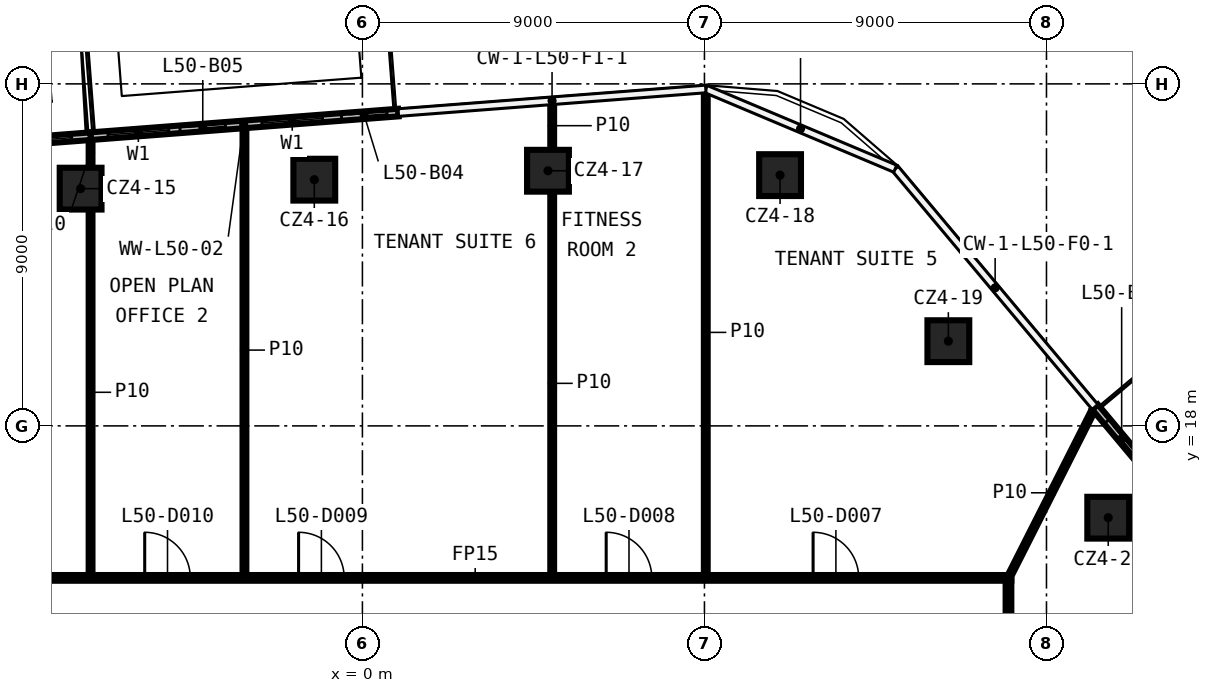
"""IFC4 building model, lengths in metres.
Left out: names, types, materials, properties, quantities, classifications, styles, units other than length and angle.
Written with IfcOpenShell. Run it as: python <this file> out.ifc"""

import sys

from ifc_helpers import new_model, si_unit, direction, frame, frame_2d, origin, origin_2d, place, context, subcontext, project, spatial, rectangle, extrude, element, fill, save


model = new_model("IFC4")
c1 = context("Model", 3, precision=1e-05, world=origin(), true_north=direction((0.0, 1.0)))
c2 = subcontext(c1, "Body", "Model", "MODEL_VIEW")
j1 = project(units=[si_unit("LENGTHUNIT", "METRE"), si_unit("PLANEANGLEUNIT", "RADIAN")], contexts=[c1])
p1 = place(None, origin())
s1 = spatial("IfcSite", under=j1, at=p1, CompositionType="ELEMENT")
p2 = place(p1, origin())
s2 = spatial("IfcBuilding", under=s1, at=p2, CompositionType="ELEMENT")
p3 = place(p2, frame((0.0, 0.0, 241.2)))
s3 = spatial("IfcBuildingStorey", under=s2, at=p3, CompositionType="ELEMENT", Elevation=241.2)
for number, where, z_axis, x_axis in (
    (1, (-7.415, 24.243, 0.0), (0.0, 0.0, 1.0), (1.0, 0.0, 0.0)),
    (2, (-1.266, 24.479, 0.0), (0.0, 0.0, 1.0), (1.0, 0.0, 0.0)),
    (3, (4.883, 24.714, 0.0), (0.0, 0.0, 1.0), (1.0, 0.0, 0.0)),
    (4, (10.99, 24.599, 0.0), (0.0, 0.0, 1.0), (1.0, 0.0, 0.0)),
    (5, (15.418, 20.229, 0.0), (0.0, 0.0, 1.0), (1.0, 0.0, 0.0)),
    (6, (19.625, 15.584, 0.0), (0.0, 0.0, 1.0), (1.0, 0.0, 0.0)),
):
    element("IfcColumn", number, at=place(p3, frame(where, z_axis=z_axis, x_axis=x_axis)), inside=s3, PredefinedType="COLUMN", context=c2, shape_type="SweptSolid", body=[
        extrude(rectangle(XDim=1.1, YDim=1.1, at=origin_2d()), origin(), (0.0, 0.0, 1.0), 3.82),
    ])
p4 = place(p3, frame((-9.075, 14.0, 0.0), z_axis=(0.0, 0.0, 1.0), x_axis=(1.0, 0.0, 0.0)))
e7 = element("IfcWall", 7, at=p4, inside=s3, PredefinedType="PARTITIONING", context=c2, shape_type="SweptSolid", body=[
    extrude(rectangle(XDim=26.15, YDim=0.15, at=frame_2d((13.075, 0.0))), origin(), (0.0, 0.0, 1.0), 3.82),
])
p5 = place(p4, frame((20.934, 0.0, 0.0)))
e8 = element("IfcOpeningElement", 8, at=p5, cuts=e7, PredefinedType="OPENING", context=c2, shape_type="SweptSolid", body=[
    extrude(rectangle(XDim=1.2, YDim=2.1, at=frame_2d((0.6, 1.05))), frame((0.0, 0.085, 0.0), z_axis=(0.0, -1.0, 0.0), x_axis=(1.0, 0.0, 0.0)), (0.0, 0.0, 1.0), 0.17),
])
p6 = place(p4, frame((15.49, 0.0, 0.0)))
e9 = element("IfcOpeningElement", 9, at=p6, cuts=e7, PredefinedType="OPENING", context=c2, shape_type="SweptSolid", body=[
    extrude(rectangle(XDim=1.2, YDim=2.1, at=frame_2d((0.6, 1.05))), frame((0.0, 0.085, 0.0), z_axis=(0.0, -1.0, 0.0), x_axis=(1.0, 0.0, 0.0)), (0.0, 0.0, 1.0), 0.17),
])
p7 = place(p4, frame((7.396, 0.0, 0.0)))
e10 = element("IfcOpeningElement", 10, at=p7, cuts=e7, PredefinedType="OPENING", context=c2, shape_type="SweptSolid", body=[
    extrude(rectangle(XDim=1.2, YDim=2.1, at=frame_2d((0.6, 1.05))), frame((0.0, 0.085, 0.0), z_axis=(0.0, -1.0, 0.0), x_axis=(1.0, 0.0, 0.0)), (0.0, 0.0, 1.0), 0.17),
])
p8 = place(p4, frame((3.346, 0.0, 0.0)))
e11 = element("IfcOpeningElement", 11, at=p8, cuts=e7, PredefinedType="OPENING", context=c2, shape_type="SweptSolid", body=[
    extrude(rectangle(XDim=1.2, YDim=2.1, at=frame_2d((0.6, 1.05))), frame((0.0, 0.085, 0.0), z_axis=(0.0, -1.0, 0.0), x_axis=(1.0, 0.0, 0.0)), (0.0, 0.0, 1.0), 0.17),
])
p9 = place(p3, frame((17.0, 14.0, 0.0), z_axis=(0.0, 0.0, 1.0), x_axis=(0.451643796449, 0.892198341811, 0.0)))
e12 = element("IfcWall", 12, at=p9, inside=s3, PredefinedType="PARTITIONING", context=c2, shape_type="SweptSolid", body=[
    extrude(rectangle(XDim=5.02, YDim=0.1, at=frame_2d((2.51, 0.0))), origin(), (0.0, 0.0, 1.0), 3.82),
])
p10 = place(p3, frame((17.0, 13.925, 0.0), z_axis=(0.0, 0.0, 1.0), x_axis=(0.0, -1.0, 0.0)))
e13 = element("IfcWall", 13, at=p10, inside=s3, PredefinedType="PARTITIONING", context=c2, shape_type="SweptSolid", body=[
    extrude(rectangle(XDim=27.85, YDim=0.15, at=frame_2d((13.925, 0.0))), origin(), (0.0, 0.0, 1.0), 3.82),
])
p11 = place(p10, frame((16.802, 0.0, 0.0)))
e14 = element("IfcOpeningElement", 14, at=p11, cuts=e13, PredefinedType="OPENING", context=c2, shape_type="SweptSolid", body=[
    extrude(rectangle(XDim=1.2, YDim=2.1, at=frame_2d((0.6, 1.05))), frame((0.0, 0.085, 0.0), z_axis=(0.0, -1.0, 0.0), x_axis=(1.0, 0.0, 0.0)), (0.0, 0.0, 1.0), 0.17),
])
p12 = place(p10, frame((12.534, 0.0, 0.0)))
e15 = element("IfcOpeningElement", 15, at=p12, cuts=e13, PredefinedType="OPENING", context=c2, shape_type="SweptSolid", body=[
    extrude(rectangle(XDim=1.2, YDim=2.1, at=frame_2d((0.6, 1.05))), frame((0.0, 0.085, 0.0), z_axis=(0.0, -1.0, 0.0), x_axis=(1.0, 0.0, 0.0)), (0.0, 0.0, 1.0), 0.17),
])
p13 = place(p3, frame((9.035, 14.075, 0.0), z_axis=(0.0, 0.0, 1.0), x_axis=(0.0, 1.0, 0.0)))
e16 = element("IfcWall", 16, at=p13, inside=s3, PredefinedType="PARTITIONING", context=c2, shape_type="SweptSolid", body=[
    extrude(rectangle(XDim=12.771, YDim=0.1, at=frame_2d((6.385, 0.0))), origin(), (0.0, 0.0, 1.0), 3.82),
])
p14 = place(p3, frame((4.994, 14.075, 0.0), z_axis=(0.0, 0.0, 1.0), x_axis=(0.0, 1.0, 0.0)))
e17 = element("IfcWall", 17, at=p14, inside=s3, PredefinedType="PARTITIONING", context=c2, shape_type="SweptSolid", body=[
    extrude(rectangle(XDim=10.089, YDim=0.1, at=frame_2d((5.044, 0.0))), origin(), (0.0, 0.0, 1.0), 3.82),
])
p15 = place(p3, frame((4.994, 25.264, 0.0), z_axis=(0.0, 0.0, 1.0), x_axis=(0.0, 1.0, 0.0)))
e18 = element("IfcWall", 18, at=p15, inside=s3, PredefinedType="PARTITIONING", context=c2, shape_type="SweptSolid", body=[
    extrude(rectangle(XDim=1.272, YDim=0.1, at=frame_2d((0.636, 0.0))), origin(), (0.0, 0.0, 1.0), 3.82),
])
p16 = place(p3, frame((-3.104, 14.075, 0.0), z_axis=(0.0, 0.0, 1.0), x_axis=(0.0, 1.0, 0.0)))
e19 = element("IfcWall", 19, at=p16, inside=s3, PredefinedType="PARTITIONING", context=c2, shape_type="SweptSolid", body=[
    extrude(rectangle(XDim=11.839, YDim=0.1, at=frame_2d((5.92, 0.0))), origin(), (0.0, 0.0, 1.0), 3.82),
])
p17 = place(p3, frame((-7.153, 14.075, 0.0), z_axis=(0.0, 0.0, 1.0), x_axis=(0.0, 1.0, 0.0)))
e20 = element("IfcWall", 20, at=p17, inside=s3, PredefinedType="PARTITIONING", context=c2, shape_type="SweptSolid", body=[
    extrude(rectangle(XDim=9.618, YDim=0.1, at=frame_2d((4.809, 0.0))), origin(), (0.0, 0.0, 1.0), 3.82),
])
p18 = place(p3, frame((-7.153, 24.793, 0.0), z_axis=(0.0, 0.0, 1.0), x_axis=(0.0, 1.0, 0.0)))
e21 = element("IfcWall", 21, at=p18, inside=s3, PredefinedType="PARTITIONING", context=c2, shape_type="SweptSolid", body=[
    extrude(rectangle(XDim=0.811, YDim=0.1, at=frame_2d((0.405, 0.0))), origin(), (0.0, 0.0, 1.0), 3.82),
])
p19 = place(p3, frame((27.162, 9.091, 0.0), z_axis=(0.0, 0.0, 1.0), x_axis=(-0.642398297857, 0.766370946025, 0.0)))
e22 = element("IfcWall", 22, at=p19, inside=s3, PredefinedType="SOLIDWALL", context=c2, shape_type="SweptSolid", body=[
    extrude(rectangle(XDim=12.275, YDim=0.2, at=frame_2d((6.137, 0.0))), origin(), (0.0, 0.0, 1.0), 3.82),
])
p20 = place(p19, frame((2.0, 0.0, 0.6)))
e23 = element("IfcOpeningElement", 23, at=p20, cuts=e22, PredefinedType="OPENING", context=c2, shape_type="SweptSolid", body=[
    extrude(rectangle(XDim=1.6, YDim=2.4, at=frame_2d((0.8, 1.2))), frame((0.0, 0.11, 0.0), z_axis=(0.0, -1.0, 0.0), x_axis=(1.0, 0.0, 0.0)), (0.0, 0.0, 1.0), 0.22),
])
p21 = place(p19, frame((0.5, 0.0, 0.0)))
e24 = element("IfcOpeningElement", 24, at=p21, cuts=e22, PredefinedType="OPENING", context=c2, shape_type="SweptSolid", body=[
    extrude(rectangle(XDim=1.2, YDim=2.4, at=frame_2d((0.6, 1.2))), frame((0.0, 0.11, 0.0), z_axis=(0.0, -1.0, 0.0), x_axis=(1.0, 0.0, 0.0)), (0.0, 0.0, 1.0), 0.22),
])
p22 = place(p19, frame((6.092, 0.0, 0.6)))
e25 = element("IfcOpeningElement", 25, at=p22, cuts=e22, PredefinedType="OPENING", context=c2, shape_type="SweptSolid", body=[
    extrude(rectangle(XDim=1.6, YDim=2.4, at=frame_2d((0.8, 1.2))), frame((0.0, 0.11, 0.0), z_axis=(0.0, -1.0, 0.0), x_axis=(1.0, 0.0, 0.0)), (0.0, 0.0, 1.0), 0.22),
])
p23 = place(p19, frame((4.592, 0.0, 0.0)))
e26 = element("IfcOpeningElement", 26, at=p23, cuts=e22, PredefinedType="OPENING", context=c2, shape_type="SweptSolid", body=[
    extrude(rectangle(XDim=1.2, YDim=2.4, at=frame_2d((0.6, 1.2))), frame((0.0, 0.11, 0.0), z_axis=(0.0, -1.0, 0.0), x_axis=(1.0, 0.0, 0.0)), (0.0, 0.0, 1.0), 0.22),
])
p24 = place(p19, frame((8.683, 0.0, 0.6)))
e27 = element("IfcOpeningElement", 27, at=p24, cuts=e22, PredefinedType="OPENING", context=c2, shape_type="SweptSolid", body=[
    extrude(rectangle(XDim=1.6, YDim=2.4, at=frame_2d((0.8, 1.2))), frame((0.0, 0.11, 0.0), z_axis=(0.0, -1.0, 0.0), x_axis=(1.0, 0.0, 0.0)), (0.0, 0.0, 1.0), 0.22),
])
p25 = place(p19, frame((10.583, 0.0, 0.0)))
e28 = element("IfcOpeningElement", 28, at=p25, cuts=e22, PredefinedType="OPENING", context=c2, shape_type="SweptSolid", body=[
    extrude(rectangle(XDim=1.2, YDim=2.4, at=frame_2d((0.6, 1.2))), frame((0.0, 0.11, 0.0), z_axis=(0.0, -1.0, 0.0), x_axis=(1.0, 0.0, 0.0)), (0.0, 0.0, 1.0), 0.22),
])
p26 = place(p3, frame((0.945, 26.245, 0.0), z_axis=(0.0, 0.0, 1.0), x_axis=(-0.997069496045, -0.076501111469, 0.0)))
e29 = element("IfcWall", 29, at=p26, inside=s3, PredefinedType="SOLIDWALL", context=c2, shape_type="SweptSolid", body=[
    extrude(rectangle(XDim=8.122, YDim=0.2, at=frame_2d((4.061, 0.0))), origin(), (0.0, 0.0, 1.0), 3.82),
])
p27 = place(p26, frame((2.0, 0.0, 0.6)))
e30 = element("IfcOpeningElement", 30, at=p27, cuts=e29, PredefinedType="OPENING", context=c2, shape_type="SweptSolid", body=[
    extrude(rectangle(XDim=1.6, YDim=2.4, at=frame_2d((0.8, 1.2))), frame((0.0, 0.11, 0.0), z_axis=(0.0, -1.0, 0.0), x_axis=(1.0, 0.0, 0.0)), (0.0, 0.0, 1.0), 0.22),
])
p28 = place(p26, frame((0.3, 0.0, 0.0)))
e31 = element("IfcOpeningElement", 31, at=p28, cuts=e29, PredefinedType="OPENING", context=c2, shape_type="SweptSolid", body=[
    extrude(rectangle(XDim=1.2, YDim=2.4, at=frame_2d((0.6, 1.2))), frame((0.0, 0.11, 0.0), z_axis=(0.0, -1.0, 0.0), x_axis=(1.0, 0.0, 0.0)), (0.0, 0.0, 1.0), 0.22),
])
p29 = place(p26, frame((6.061, 0.0, 0.6)))
e32 = element("IfcOpeningElement", 32, at=p29, cuts=e29, PredefinedType="OPENING", context=c2, shape_type="SweptSolid", body=[
    extrude(rectangle(XDim=1.6, YDim=2.4, at=frame_2d((0.8, 1.2))), frame((0.0, 0.11, 0.0), z_axis=(0.0, -1.0, 0.0), x_axis=(1.0, 0.0, 0.0)), (0.0, 0.0, 1.0), 0.22),
])
p30 = place(p26, frame((4.561, 0.0, 0.0)))
e33 = element("IfcOpeningElement", 33, at=p30, cuts=e29, PredefinedType="OPENING", context=c2, shape_type="SweptSolid", body=[
    extrude(rectangle(XDim=1.2, YDim=2.4, at=frame_2d((0.6, 1.2))), frame((0.0, 0.11, 0.0), z_axis=(0.0, -1.0, 0.0), x_axis=(1.0, 0.0, 0.0)), (0.0, 0.0, 1.0), 0.22),
])
p31 = place(p3, frame((-7.153, 25.624, 0.0), z_axis=(0.0, 0.0, 1.0), x_axis=(-0.997068643963, -0.076512216183, 0.0)))
e34 = element("IfcWall", 34, at=p31, inside=s3, PredefinedType="SOLIDWALL", context=c2, shape_type="SweptSolid", body=[
    extrude(rectangle(XDim=4.052, YDim=0.2, at=frame_2d((2.026, 0.0))), origin(), (0.0, 0.0, 1.0), 3.82),
])
p32 = place(p31, frame((0.5, 0.0, 0.6)))
e35 = element("IfcOpeningElement", 35, at=p32, cuts=e34, PredefinedType="OPENING", context=c2, shape_type="SweptSolid", body=[
    extrude(rectangle(XDim=1.6, YDim=2.4, at=frame_2d((0.8, 1.2))), frame((0.0, 0.11, 0.0), z_axis=(0.0, -1.0, 0.0), x_axis=(1.0, 0.0, 0.0)), (0.0, 0.0, 1.0), 0.22),
])
p33 = place(p31, frame((2.4, 0.0, 0.0)))
e36 = element("IfcOpeningElement", 36, at=p33, cuts=e34, PredefinedType="OPENING", context=c2, shape_type="SweptSolid", body=[
    extrude(rectangle(XDim=1.2, YDim=2.4, at=frame_2d((0.6, 1.2))), frame((0.0, 0.11, 0.0), z_axis=(0.0, -1.0, 0.0), x_axis=(1.0, 0.0, 0.0)), (0.0, 0.0, 1.0), 0.22),
])
p34 = place(p5, origin())
e37 = element("IfcDoor", 37, at=p34, inside=s3, OperationType="SINGLE_SWING_RIGHT", PredefinedType="DOOR", context=c2, shape_type="SweptSolid", body=[
    extrude(rectangle(XDim=1.2, YDim=2.1, at=frame_2d((0.6, 1.05))), frame((0.0, 0.025, 0.0), z_axis=(0.0, -1.0, 0.0), x_axis=(1.0, 0.0, 0.0)), (0.0, 0.0, 1.0), 0.05),
])
fill(e8, e37)
p35 = place(p6, origin())
e38 = element("IfcDoor", 38, at=p35, inside=s3, OperationType="SINGLE_SWING_LEFT", PredefinedType="DOOR", context=c2, shape_type="SweptSolid", body=[
    extrude(rectangle(XDim=1.2, YDim=2.1, at=frame_2d((0.6, 1.05))), frame((0.0, 0.025, 0.0), z_axis=(0.0, -1.0, 0.0), x_axis=(1.0, 0.0, 0.0)), (0.0, 0.0, 1.0), 0.05),
])
fill(e9, e38)
p36 = place(p7, origin())
e39 = element("IfcDoor", 39, at=p36, inside=s3, OperationType="SINGLE_SWING_RIGHT", PredefinedType="DOOR", context=c2, shape_type="SweptSolid", body=[
    extrude(rectangle(XDim=1.2, YDim=2.1, at=frame_2d((0.6, 1.05))), frame((0.0, 0.025, 0.0), z_axis=(0.0, -1.0, 0.0), x_axis=(1.0, 0.0, 0.0)), (0.0, 0.0, 1.0), 0.05),
])
fill(e10, e39)
p37 = place(p8, origin())
e40 = element("IfcDoor", 40, at=p37, inside=s3, OperationType="SINGLE_SWING_LEFT", PredefinedType="DOOR", context=c2, shape_type="SweptSolid", body=[
    extrude(rectangle(XDim=1.2, YDim=2.1, at=frame_2d((0.6, 1.05))), frame((0.0, 0.025, 0.0), z_axis=(0.0, -1.0, 0.0), x_axis=(1.0, 0.0, 0.0)), (0.0, 0.0, 1.0), 0.05),
])
fill(e11, e40)
p38 = place(p25, origin())
e41 = element("IfcDoor", 41, at=p38, inside=s3, OperationType="SLIDING_TO_LEFT", PredefinedType="DOOR", context=c2, shape_type="SweptSolid", body=[
    extrude(rectangle(XDim=1.2, YDim=2.4, at=frame_2d((0.6, 1.2))), frame((0.0, 0.025, 0.0), z_axis=(0.0, -1.0, 0.0), x_axis=(1.0, 0.0, 0.0)), (0.0, 0.0, 1.0), 0.05),
])
fill(e28, e41)
p39 = place(p27, origin())
e42 = element("IfcWindow", 42, at=p39, inside=s3, PartitioningType="SINGLE_PANEL", PredefinedType="WINDOW", context=c2, shape_type="SweptSolid", body=[
    extrude(rectangle(XDim=1.6, YDim=2.4, at=frame_2d((0.8, 1.2))), frame((0.0, 0.03, 0.0), z_axis=(0.0, -1.0, 0.0), x_axis=(1.0, 0.0, 0.0)), (0.0, 0.0, 1.0), 0.06),
])
fill(e30, e42)
p40 = place(p28, origin())
e43 = element("IfcDoor", 43, at=p40, inside=s3, OperationType="SLIDING_TO_LEFT", PredefinedType="DOOR", context=c2, shape_type="SweptSolid", body=[
    extrude(rectangle(XDim=1.2, YDim=2.4, at=frame_2d((0.6, 1.2))), frame((0.0, 0.025, 0.0), z_axis=(0.0, -1.0, 0.0), x_axis=(1.0, 0.0, 0.0)), (0.0, 0.0, 1.0), 0.05),
])
fill(e31, e43)
p41 = place(p29, origin())
e44 = element("IfcWindow", 44, at=p41, inside=s3, PartitioningType="SINGLE_PANEL", PredefinedType="WINDOW", context=c2, shape_type="SweptSolid", body=[
    extrude(rectangle(XDim=1.6, YDim=2.4, at=frame_2d((0.8, 1.2))), frame((0.0, 0.03, 0.0), z_axis=(0.0, -1.0, 0.0), x_axis=(1.0, 0.0, 0.0)), (0.0, 0.0, 1.0), 0.06),
])
fill(e32, e44)
p42 = place(p30, origin())
e45 = element("IfcDoor", 45, at=p42, inside=s3, OperationType="SLIDING_TO_LEFT", PredefinedType="DOOR", context=c2, shape_type="SweptSolid", body=[
    extrude(rectangle(XDim=1.2, YDim=2.4, at=frame_2d((0.6, 1.2))), frame((0.0, 0.025, 0.0), z_axis=(0.0, -1.0, 0.0), x_axis=(1.0, 0.0, 0.0)), (0.0, 0.0, 1.0), 0.05),
])
fill(e33, e45)
p43 = place(p32, origin())
e46 = element("IfcWindow", 46, at=p43, inside=s3, PartitioningType="SINGLE_PANEL", PredefinedType="WINDOW", context=c2, shape_type="SweptSolid", body=[
    extrude(rectangle(XDim=1.6, YDim=2.4, at=frame_2d((0.8, 1.2))), frame((0.0, 0.03, 0.0), z_axis=(0.0, -1.0, 0.0), x_axis=(1.0, 0.0, 0.0)), (0.0, 0.0, 1.0), 0.06),
])
fill(e35, e46)
save(model, sys.argv[1])
